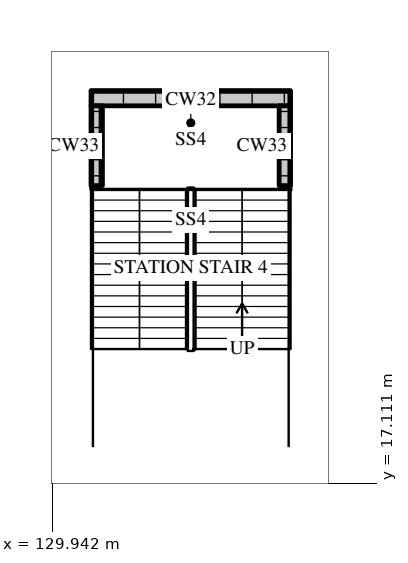
"""IFC4 building model, lengths in metres.
Left out: names, types, materials, properties, quantities, classifications, styles, units other than length and angle.
Written with IfcOpenShell. Run it as: python <this file> out.ifc"""

import sys

from ifc_helpers import new_model, si_unit, direction, frame, frame_2d, origin, place, context, subcontext, project, spatial, rectangle, extrude, element, save


model = new_model("IFC4")
c1 = context("Model", 3, precision=1e-05, world=origin(), true_north=direction((0.0, 1.0)))
c2 = subcontext(c1, "Body", "Model", "MODEL_VIEW")
j1 = project(units=[si_unit("LENGTHUNIT", "METRE"), si_unit("PLANEANGLEUNIT", "RADIAN")], contexts=[c1])
p1 = place(None, origin())
s1 = spatial("IfcSite", under=j1, at=p1, CompositionType="ELEMENT")
p2 = place(p1, origin())
s2 = spatial("IfcBuilding", under=s1, at=p2, CompositionType="ELEMENT")
p3 = place(p2, frame((0.0, 0.0, -6.0)))
s3 = spatial("IfcBuildingStorey", under=s2, at=p3, CompositionType="ELEMENT", Elevation=-6.0)
p4 = place(p3, frame((136.2, 27.25, 0.0), z_axis=(0.0, 0.0, 1.0), x_axis=(-1.0, 0.0, 0.0)))
e1 = element("IfcWall", 1, at=p4, inside=s3, PredefinedType="SOLIDWALL", context=c2, shape_type="SweptSolid", body=[
    extrude(rectangle(XDim=5.25, YDim=0.4, at=frame_2d((2.625, 0.0))), origin(), (0.0, 0.0, 1.0), 2.8),
])
for number, where, z_axis, x_axis in (
    (2, (136.05, 24.95, 0.0), (0.0, 0.0, 1.0), (0.0, 1.0, 0.0)),
    (3, (131.1, 24.95, 0.0), (0.0, 0.0, 1.0), (0.0, 1.0, 0.0)),
):
    element("IfcWall", number, at=place(p3, frame(where, z_axis=z_axis, x_axis=x_axis)), inside=s3, PredefinedType="SOLIDWALL", context=c2, shape_type="SweptSolid", body=[
        extrude(rectangle(XDim=2.1, YDim=0.3, at=frame_2d((1.05, 0.0))), origin(), (0.0, 0.0, 1.0), 2.8),
    ])
save(model, sys.argv[1])
